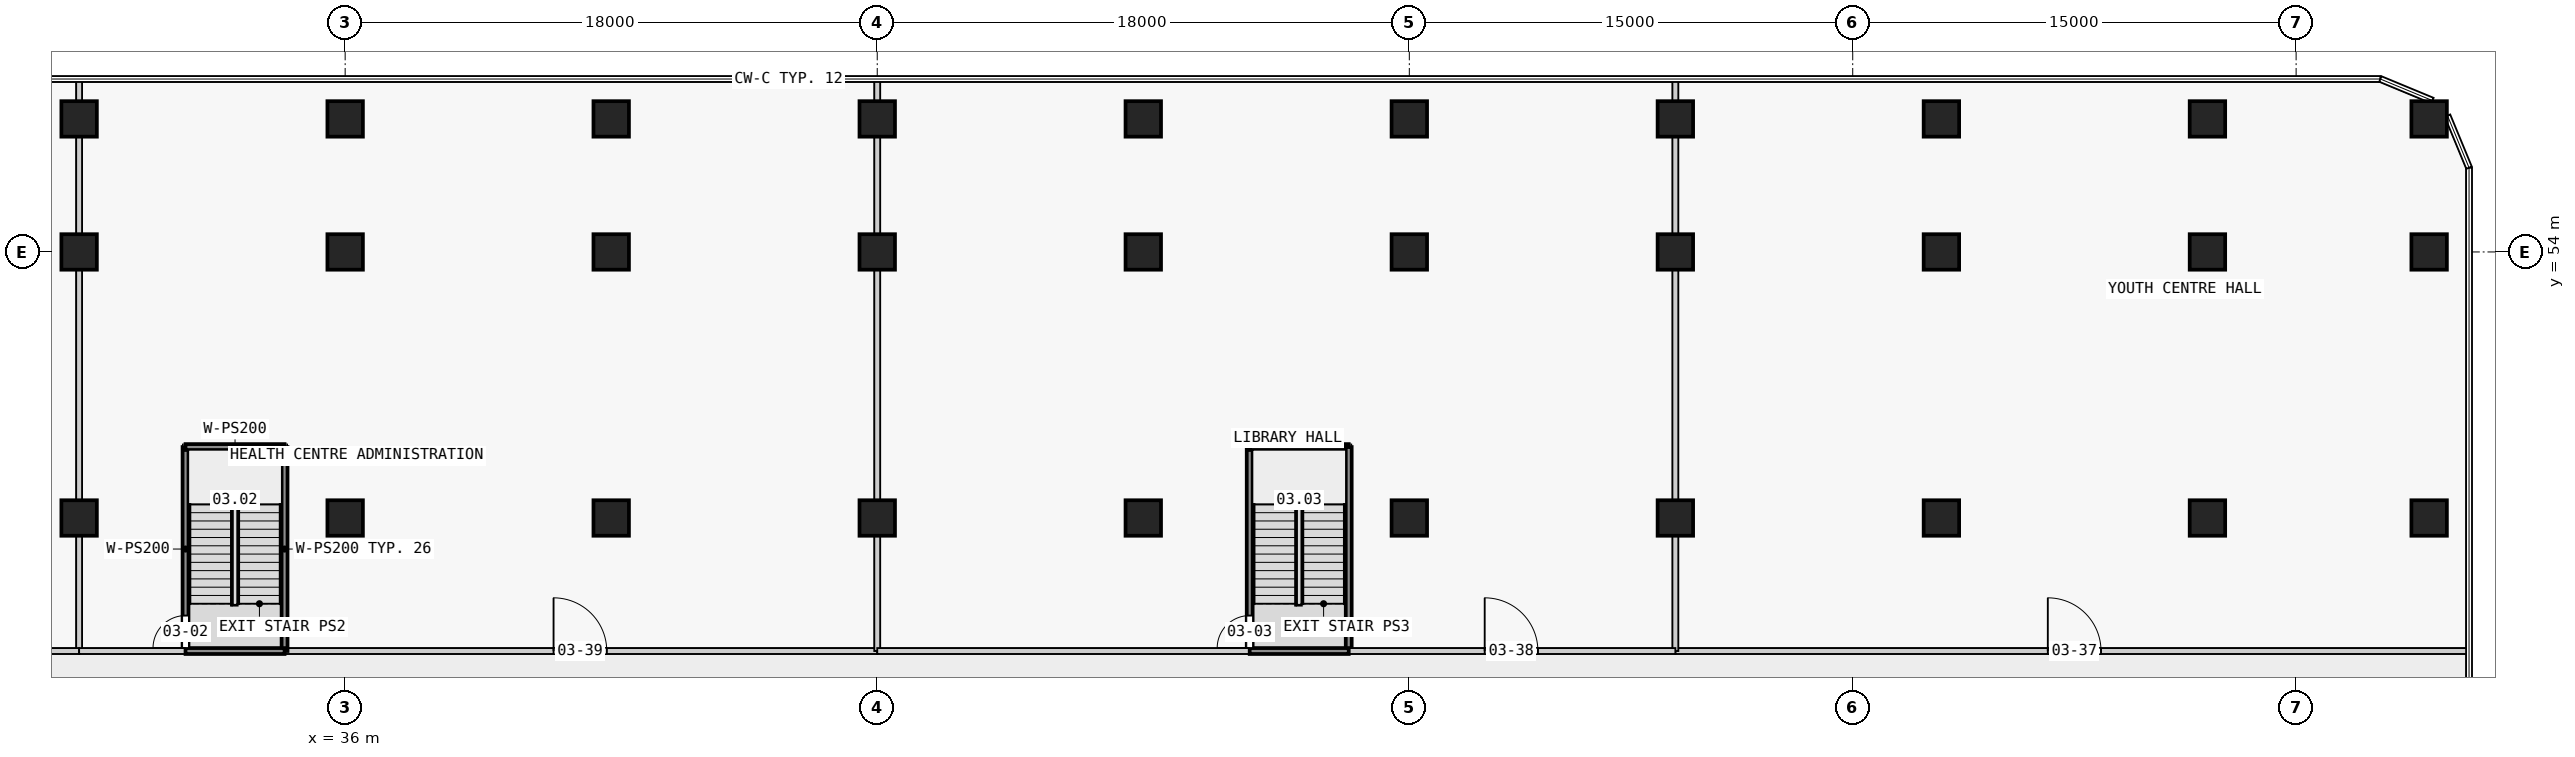
"""IFC4 building model, lengths in metres.
Left out: names, types, materials, properties, quantities, classifications, styles, units other than length and angle.
Written with IfcOpenShell. Run it as: python <this file> out.ifc"""

import sys

from ifc_helpers import new_model, si_unit, direction, frame, frame_2d, origin, origin_2d, place, context, subcontext, project, spatial, rectangle, extrude, element, fill, save


model = new_model("IFC4")
c1 = context("Model", 3, precision=1e-05, world=origin(), true_north=direction((0.0, 1.0)))
c2 = subcontext(c1, "Body", "Model", "MODEL_VIEW")
j1 = project(units=[si_unit("LENGTHUNIT", "METRE"), si_unit("PLANEANGLEUNIT", "RADIAN")], contexts=[c1])
p1 = place(None, origin())
s1 = spatial("IfcSite", under=j1, at=p1, CompositionType="ELEMENT")
p2 = place(p1, origin())
s2 = spatial("IfcBuilding", under=s1, at=p2, CompositionType="ELEMENT")
p3 = place(p2, frame((0.0, 0.0, 17.3)))
s3 = spatial("IfcBuildingStorey", under=s2, at=p3, CompositionType="ELEMENT", Elevation=17.3)
for number, where, z_axis, x_axis in (
    (1, (27.0, 45.0, 0.0), (0.0, 0.0, 1.0), (1.0, 0.0, 0.0)),
    (2, (27.0, 54.0, 0.0), (0.0, 0.0, 1.0), (1.0, 0.0, 0.0)),
    (3, (27.0, 58.5, 0.0), (0.0, 0.0, 1.0), (1.0, 0.0, 0.0)),
    (4, (36.0, 45.0, 0.0), (0.0, 0.0, 1.0), (1.0, 0.0, 0.0)),
    (5, (36.0, 54.0, 0.0), (0.0, 0.0, 1.0), (1.0, 0.0, 0.0)),
    (6, (36.0, 58.5, 0.0), (0.0, 0.0, 1.0), (1.0, 0.0, 0.0)),
    (7, (45.0, 45.0, 0.0), (0.0, 0.0, 1.0), (1.0, 0.0, 0.0)),
    (8, (45.0, 54.0, 0.0), (0.0, 0.0, 1.0), (1.0, 0.0, 0.0)),
    (9, (45.0, 58.5, 0.0), (0.0, 0.0, 1.0), (1.0, 0.0, 0.0)),
    (10, (54.0, 45.0, 0.0), (0.0, 0.0, 1.0), (1.0, 0.0, 0.0)),
    (11, (54.0, 54.0, 0.0), (0.0, 0.0, 1.0), (1.0, 0.0, 0.0)),
    (12, (54.0, 58.5, 0.0), (0.0, 0.0, 1.0), (1.0, 0.0, 0.0)),
    (13, (63.0, 45.0, 0.0), (0.0, 0.0, 1.0), (1.0, 0.0, 0.0)),
    (14, (63.0, 54.0, 0.0), (0.0, 0.0, 1.0), (1.0, 0.0, 0.0)),
    (15, (63.0, 58.5, 0.0), (0.0, 0.0, 1.0), (1.0, 0.0, 0.0)),
    (16, (72.0, 45.0, 0.0), (0.0, 0.0, 1.0), (1.0, 0.0, 0.0)),
    (17, (72.0, 54.0, 0.0), (0.0, 0.0, 1.0), (1.0, 0.0, 0.0)),
    (18, (72.0, 58.5, 0.0), (0.0, 0.0, 1.0), (1.0, 0.0, 0.0)),
    (19, (81.0, 45.0, 0.0), (0.0, 0.0, 1.0), (1.0, 0.0, 0.0)),
    (20, (81.0, 54.0, 0.0), (0.0, 0.0, 1.0), (1.0, 0.0, 0.0)),
    (21, (81.0, 58.5, 0.0), (0.0, 0.0, 1.0), (1.0, 0.0, 0.0)),
    (22, (90.0, 45.0, 0.0), (0.0, 0.0, 1.0), (1.0, 0.0, 0.0)),
    (23, (90.0, 54.0, 0.0), (0.0, 0.0, 1.0), (1.0, 0.0, 0.0)),
    (24, (90.0, 58.5, 0.0), (0.0, 0.0, 1.0), (1.0, 0.0, 0.0)),
    (25, (99.0, 45.0, 0.0), (0.0, 0.0, 1.0), (1.0, 0.0, 0.0)),
    (26, (99.0, 54.0, 0.0), (0.0, 0.0, 1.0), (1.0, 0.0, 0.0)),
    (27, (99.0, 58.5, 0.0), (0.0, 0.0, 1.0), (1.0, 0.0, 0.0)),
    (28, (106.5, 45.0, 0.0), (0.0, 0.0, 1.0), (1.0, 0.0, 0.0)),
    (29, (106.5, 54.0, 0.0), (0.0, 0.0, 1.0), (1.0, 0.0, 0.0)),
    (30, (106.5, 58.5, 0.0), (0.0, 0.0, 1.0), (1.0, 0.0, 0.0)),
):
    element("IfcColumn", number, at=place(p3, frame(where, z_axis=z_axis, x_axis=x_axis)), inside=s3, PredefinedType="COLUMN", context=c2, shape_type="SweptSolid", body=[
        extrude(rectangle(XDim=1.2, YDim=1.2, at=origin_2d()), origin(), (0.0, 0.0, 1.0), 4.5),
    ])
p4 = place(p3, frame((81.0, 40.5, 0.0), z_axis=(0.0, 0.0, 1.0), x_axis=(1.0, 0.0, 0.0)))
e31 = element("IfcWall", 31, at=p4, inside=s3, PredefinedType="PARTITIONING", context=c2, shape_type="SweptSolid", body=[
    extrude(rectangle(XDim=26.85, YDim=0.2, at=frame_2d((13.425, 0.0))), origin(), (0.0, 0.0, 1.0), 4.15),
])
p5 = place(p4, frame((12.6, 0.0, 0.0)))
e32 = element("IfcOpeningElement", 32, at=p5, cuts=e31, PredefinedType="OPENING", context=c2, shape_type="SweptSolid", body=[
    extrude(rectangle(XDim=1.8, YDim=2.1, at=frame_2d((0.9, 1.05))), frame((0.0, 0.11, 0.0), z_axis=(0.0, -1.0, 0.0), x_axis=(1.0, 0.0, 0.0)), (0.0, 0.0, 1.0), 0.22),
])
p6 = place(p3, frame((33.95, 40.5, 0.0), z_axis=(0.0, 0.0, 1.0), x_axis=(1.0, 0.0, 0.0)))
e33 = element("IfcWall", 33, at=p6, inside=s3, PredefinedType="PARTITIONING", context=c2, shape_type="SweptSolid", body=[
    extrude(rectangle(XDim=20.05, YDim=0.2, at=frame_2d((10.025, 0.0))), origin(), (0.0, 0.0, 1.0), 4.15),
])
p7 = place(p6, frame((9.1, 0.0, 0.0)))
e34 = element("IfcOpeningElement", 34, at=p7, cuts=e33, PredefinedType="OPENING", context=c2, shape_type="SweptSolid", body=[
    extrude(rectangle(XDim=1.8, YDim=2.1, at=frame_2d((0.9, 1.05))), frame((0.0, 0.11, 0.0), z_axis=(0.0, -1.0, 0.0), x_axis=(1.0, 0.0, 0.0)), (0.0, 0.0, 1.0), 0.22),
])
p8 = place(p3, frame((54.0, 59.85, 0.0), z_axis=(0.0, 0.0, 1.0), x_axis=(0.0, -1.0, 0.0)))
e35 = element("IfcWall", 35, at=p8, inside=s3, PredefinedType="PARTITIONING", context=c2, shape_type="SweptSolid", body=[
    extrude(rectangle(XDim=0.75, YDim=0.2, at=frame_2d((0.375, 0.0))), origin(), (0.0, 0.0, 1.0), 4.15),
])
p9 = place(p3, frame((54.0, 57.9, 0.0), z_axis=(0.0, 0.0, 1.0), x_axis=(0.0, -1.0, 0.0)))
e36 = element("IfcWall", 36, at=p9, inside=s3, PredefinedType="PARTITIONING", context=c2, shape_type="SweptSolid", body=[
    extrude(rectangle(XDim=3.3, YDim=0.2, at=frame_2d((1.65, 0.0))), origin(), (0.0, 0.0, 1.0), 4.15),
])
p10 = place(p3, frame((54.0, 53.4, 0.0), z_axis=(0.0, 0.0, 1.0), x_axis=(0.0, -1.0, 0.0)))
e37 = element("IfcWall", 37, at=p10, inside=s3, PredefinedType="PARTITIONING", context=c2, shape_type="SweptSolid", body=[
    extrude(rectangle(XDim=7.8, YDim=0.2, at=frame_2d((3.9, 0.0))), origin(), (0.0, 0.0, 1.0), 4.15),
])
p11 = place(p3, frame((54.0, 44.4, 0.0), z_axis=(0.0, 0.0, 1.0), x_axis=(0.0, -1.0, 0.0)))
e38 = element("IfcWall", 38, at=p11, inside=s3, PredefinedType="PARTITIONING", context=c2, shape_type="SweptSolid", body=[
    extrude(rectangle(XDim=3.9, YDim=0.2, at=frame_2d((1.95, 0.0))), origin(), (0.0, 0.0, 1.0), 4.15),
])
p12 = place(p3, frame((81.0, 59.85, 0.0), z_axis=(0.0, 0.0, 1.0), x_axis=(0.0, -1.0, 0.0)))
e39 = element("IfcWall", 39, at=p12, inside=s3, PredefinedType="PARTITIONING", context=c2, shape_type="SweptSolid", body=[
    extrude(rectangle(XDim=0.75, YDim=0.2, at=frame_2d((0.375, 0.0))), origin(), (0.0, 0.0, 1.0), 4.15),
])
p13 = place(p3, frame((81.0, 57.9, 0.0), z_axis=(0.0, 0.0, 1.0), x_axis=(0.0, -1.0, 0.0)))
e40 = element("IfcWall", 40, at=p13, inside=s3, PredefinedType="PARTITIONING", context=c2, shape_type="SweptSolid", body=[
    extrude(rectangle(XDim=3.3, YDim=0.2, at=frame_2d((1.65, 0.0))), origin(), (0.0, 0.0, 1.0), 4.15),
])
p14 = place(p3, frame((81.0, 53.4, 0.0), z_axis=(0.0, 0.0, 1.0), x_axis=(0.0, -1.0, 0.0)))
e41 = element("IfcWall", 41, at=p14, inside=s3, PredefinedType="PARTITIONING", context=c2, shape_type="SweptSolid", body=[
    extrude(rectangle(XDim=7.8, YDim=0.2, at=frame_2d((3.9, 0.0))), origin(), (0.0, 0.0, 1.0), 4.15),
])
p15 = place(p3, frame((81.0, 44.4, 0.0), z_axis=(0.0, 0.0, 1.0), x_axis=(0.0, -1.0, 0.0)))
e42 = element("IfcWall", 42, at=p15, inside=s3, PredefinedType="PARTITIONING", context=c2, shape_type="SweptSolid", body=[
    extrude(rectangle(XDim=3.9, YDim=0.2, at=frame_2d((1.95, 0.0))), origin(), (0.0, 0.0, 1.0), 4.15),
])
p16 = place(p3, frame((27.0, 59.85, 0.0), z_axis=(0.0, 0.0, 1.0), x_axis=(0.0, -1.0, 0.0)))
e43 = element("IfcWall", 43, at=p16, inside=s3, PredefinedType="PARTITIONING", context=c2, shape_type="SweptSolid", body=[
    extrude(rectangle(XDim=0.75, YDim=0.2, at=frame_2d((0.375, 0.0))), origin(), (0.0, 0.0, 1.0), 4.15),
])
p17 = place(p3, frame((27.0, 57.9, 0.0), z_axis=(0.0, 0.0, 1.0), x_axis=(0.0, -1.0, 0.0)))
e44 = element("IfcWall", 44, at=p17, inside=s3, PredefinedType="PARTITIONING", context=c2, shape_type="SweptSolid", body=[
    extrude(rectangle(XDim=3.3, YDim=0.2, at=frame_2d((1.65, 0.0))), origin(), (0.0, 0.0, 1.0), 4.15),
])
p18 = place(p3, frame((27.0, 53.4, 0.0), z_axis=(0.0, 0.0, 1.0), x_axis=(0.0, -1.0, 0.0)))
e45 = element("IfcWall", 45, at=p18, inside=s3, PredefinedType="PARTITIONING", context=c2, shape_type="SweptSolid", body=[
    extrude(rectangle(XDim=7.8, YDim=0.2, at=frame_2d((3.9, 0.0))), origin(), (0.0, 0.0, 1.0), 4.15),
])
p19 = place(p3, frame((27.0, 44.4, 0.0), z_axis=(0.0, 0.0, 1.0), x_axis=(0.0, -1.0, 0.0)))
e46 = element("IfcWall", 46, at=p19, inside=s3, PredefinedType="PARTITIONING", context=c2, shape_type="SweptSolid", body=[
    extrude(rectangle(XDim=3.9, YDim=0.2, at=frame_2d((1.95, 0.0))), origin(), (0.0, 0.0, 1.0), 4.15),
])
p20 = place(p3, frame((30.6, 40.5, 0.0), z_axis=(0.0, 0.0, 1.0), x_axis=(0.0, 1.0, 0.0)))
e47 = element("IfcWall", 47, at=p20, inside=s3, PredefinedType="PARTITIONING", context=c2, shape_type="SweptSolid", body=[
    extrude(rectangle(XDim=6.9, YDim=0.2, at=frame_2d((3.45, 0.0))), origin(), (0.0, 0.0, 1.0), 4.15),
])
p21 = place(p20, frame((0.1, 0.0, 0.0)))
e48 = element("IfcOpeningElement", 48, at=p21, cuts=e47, PredefinedType="OPENING", context=c2, shape_type="SweptSolid", body=[
    extrude(rectangle(XDim=1.1, YDim=2.1, at=frame_2d((0.55, 1.05))), frame((0.0, 0.11, 0.0), z_axis=(0.0, -1.0, 0.0), x_axis=(1.0, 0.0, 0.0)), (0.0, 0.0, 1.0), 0.22),
])
p22 = place(p3, frame((30.6, 47.4, 0.0), z_axis=(0.0, 0.0, 1.0), x_axis=(1.0, 0.0, 0.0)))
e49 = element("IfcWall", 49, at=p22, inside=s3, PredefinedType="PARTITIONING", context=c2, shape_type="SweptSolid", body=[
    extrude(rectangle(XDim=3.35, YDim=0.2, at=frame_2d((1.675, 0.0))), origin(), (0.0, 0.0, 1.0), 4.15),
])
p23 = place(p3, frame((33.95, 47.4, 0.0), z_axis=(0.0, 0.0, 1.0), x_axis=(0.0, -1.0, 0.0)))
e50 = element("IfcWall", 50, at=p23, inside=s3, PredefinedType="PARTITIONING", context=c2, shape_type="SweptSolid", body=[
    extrude(rectangle(XDim=6.9, YDim=0.2, at=frame_2d((3.45, 0.0))), origin(), (0.0, 0.0, 1.0), 4.15),
])
p24 = place(p3, frame((66.6, 40.5, 0.0), z_axis=(0.0, 0.0, 1.0), x_axis=(0.0, 1.0, 0.0)))
e51 = element("IfcWall", 51, at=p24, inside=s3, PredefinedType="PARTITIONING", context=c2, shape_type="SweptSolid", body=[
    extrude(rectangle(XDim=6.9, YDim=0.2, at=frame_2d((3.45, 0.0))), origin(), (0.0, 0.0, 1.0), 4.15),
])
p25 = place(p24, frame((0.1, 0.0, 0.0)))
e52 = element("IfcOpeningElement", 52, at=p25, cuts=e51, PredefinedType="OPENING", context=c2, shape_type="SweptSolid", body=[
    extrude(rectangle(XDim=1.1, YDim=2.1, at=frame_2d((0.55, 1.05))), frame((0.0, 0.11, 0.0), z_axis=(0.0, -1.0, 0.0), x_axis=(1.0, 0.0, 0.0)), (0.0, 0.0, 1.0), 0.22),
])
p26 = place(p3, frame((66.6, 47.4, 0.0), z_axis=(0.0, 0.0, 1.0), x_axis=(1.0, 0.0, 0.0)))
e53 = element("IfcWall", 53, at=p26, inside=s3, PredefinedType="PARTITIONING", context=c2, shape_type="SweptSolid", body=[
    extrude(rectangle(XDim=3.35, YDim=0.2, at=frame_2d((1.675, 0.0))), origin(), (0.0, 0.0, 1.0), 4.15),
])
p27 = place(p3, frame((69.95, 47.4, 0.0), z_axis=(0.0, 0.0, 1.0), x_axis=(0.0, -1.0, 0.0)))
e54 = element("IfcWall", 54, at=p27, inside=s3, PredefinedType="PARTITIONING", context=c2, shape_type="SweptSolid", body=[
    extrude(rectangle(XDim=6.9, YDim=0.2, at=frame_2d((3.45, 0.0))), origin(), (0.0, 0.0, 1.0), 4.15),
])
p28 = place(p3, frame((54.0, 40.5, 0.0), z_axis=(0.0, 0.0, 1.0), x_axis=(1.0, 0.0, 0.0)))
e55 = element("IfcWall", 55, at=p28, inside=s3, PredefinedType="PARTITIONING", context=c2, shape_type="SweptSolid", body=[
    extrude(rectangle(XDim=12.6, YDim=0.2, at=frame_2d((6.3, 0.0))), origin(), (0.0, 0.0, 1.0), 4.15),
])
p29 = place(p3, frame((69.95, 40.5, 0.0), z_axis=(0.0, 0.0, 1.0), x_axis=(1.0, 0.0, 0.0)))
e56 = element("IfcWall", 56, at=p29, inside=s3, PredefinedType="PARTITIONING", context=c2, shape_type="SweptSolid", body=[
    extrude(rectangle(XDim=11.05, YDim=0.2, at=frame_2d((5.525, 0.0))), origin(), (0.0, 0.0, 1.0), 4.15),
])
p30 = place(p29, frame((4.6, 0.0, 0.0)))
e57 = element("IfcOpeningElement", 57, at=p30, cuts=e56, PredefinedType="OPENING", context=c2, shape_type="SweptSolid", body=[
    extrude(rectangle(XDim=1.8, YDim=2.1, at=frame_2d((0.9, 1.05))), frame((0.0, 0.11, 0.0), z_axis=(0.0, -1.0, 0.0), x_axis=(1.0, 0.0, 0.0)), (0.0, 0.0, 1.0), 0.22),
])
p31 = place(p3, frame((16.15, 40.5, 0.0), z_axis=(0.0, 0.0, 1.0), x_axis=(1.0, 0.0, 0.0)))
e58 = element("IfcWall", 58, at=p31, inside=s3, PredefinedType="PARTITIONING", context=c2, shape_type="SweptSolid", body=[
    extrude(rectangle(XDim=10.85, YDim=0.2, at=frame_2d((5.425, 0.0))), origin(), (0.0, 0.0, 1.0), 4.15),
])
p32 = place(p3, frame((27.0, 40.5, 0.0), z_axis=(0.0, 0.0, 1.0), x_axis=(1.0, 0.0, 0.0)))
e59 = element("IfcWall", 59, at=p32, inside=s3, PredefinedType="PARTITIONING", context=c2, shape_type="SweptSolid", body=[
    extrude(rectangle(XDim=3.6, YDim=0.2, at=frame_2d((1.8, 0.0))), origin(), (0.0, 0.0, 1.0), 4.15),
])
for number, where, z_axis, x_axis in (
    (60, (33.95, 40.5, 0.0), (0.0, 0.0, 1.0), (-1.0, 0.0, 0.0)),
    (61, (69.95, 40.5, 0.0), (0.0, 0.0, 1.0), (-1.0, 0.0, 0.0)),
):
    element("IfcWall", number, at=place(p3, frame(where, z_axis=z_axis, x_axis=x_axis)), inside=s3, PredefinedType="PARTITIONING", context=c2, shape_type="SweptSolid", body=[
        extrude(rectangle(XDim=3.35, YDim=0.2, at=frame_2d((1.675, 0.0))), origin(), (0.0, 0.0, 1.0), 4.15),
    ])
p33 = place(p21, origin())
e62 = element("IfcDoor", 62, at=p33, inside=s3, OperationType="SINGLE_SWING_LEFT", PredefinedType="DOOR", context=c2, shape_type="SweptSolid", body=[
    extrude(rectangle(XDim=1.1, YDim=2.1, at=frame_2d((0.55, 1.05))), frame((0.0, 0.025, 0.0), z_axis=(0.0, -1.0, 0.0), x_axis=(1.0, 0.0, 0.0)), (0.0, 0.0, 1.0), 0.05),
])
fill(e48, e62)
p34 = place(p25, origin())
e63 = element("IfcDoor", 63, at=p34, inside=s3, OperationType="SINGLE_SWING_LEFT", PredefinedType="DOOR", context=c2, shape_type="SweptSolid", body=[
    extrude(rectangle(XDim=1.1, YDim=2.1, at=frame_2d((0.55, 1.05))), frame((0.0, 0.025, 0.0), z_axis=(0.0, -1.0, 0.0), x_axis=(1.0, 0.0, 0.0)), (0.0, 0.0, 1.0), 0.05),
])
fill(e52, e63)
p35 = place(p5, origin())
e64 = element("IfcDoor", 64, at=p35, inside=s3, OperationType="DOUBLE_DOOR_SINGLE_SWING", PredefinedType="DOOR", context=c2, shape_type="SweptSolid", body=[
    extrude(rectangle(XDim=1.8, YDim=2.1, at=frame_2d((0.9, 1.05))), frame((0.0, 0.025, 0.0), z_axis=(0.0, -1.0, 0.0), x_axis=(1.0, 0.0, 0.0)), (0.0, 0.0, 1.0), 0.05),
])
fill(e32, e64)
p36 = place(p30, origin())
e65 = element("IfcDoor", 65, at=p36, inside=s3, OperationType="DOUBLE_DOOR_SINGLE_SWING", PredefinedType="DOOR", context=c2, shape_type="SweptSolid", body=[
    extrude(rectangle(XDim=1.8, YDim=2.1, at=frame_2d((0.9, 1.05))), frame((0.0, 0.025, 0.0), z_axis=(0.0, -1.0, 0.0), x_axis=(1.0, 0.0, 0.0)), (0.0, 0.0, 1.0), 0.05),
])
fill(e57, e65)
p37 = place(p7, origin())
e66 = element("IfcDoor", 66, at=p37, inside=s3, OperationType="DOUBLE_DOOR_SINGLE_SWING", PredefinedType="DOOR", context=c2, shape_type="SweptSolid", body=[
    extrude(rectangle(XDim=1.8, YDim=2.1, at=frame_2d((0.9, 1.05))), frame((0.0, 0.025, 0.0), z_axis=(0.0, -1.0, 0.0), x_axis=(1.0, 0.0, 0.0)), (0.0, 0.0, 1.0), 0.05),
])
fill(e34, e66)
save(model, sys.argv[1])
